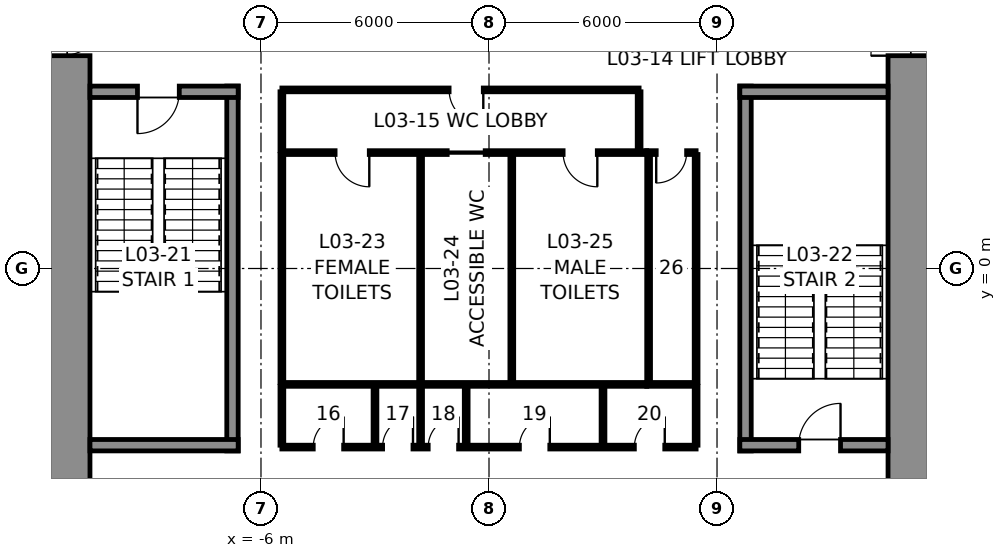
"""IFC4 building model, lengths in metres.
Left out: names, types, materials, properties, quantities, classifications, styles, units other than length and angle.
Written with IfcOpenShell. Run it as: python <this file> out.ifc"""

import sys

from ifc_helpers import new_model, si_unit, direction, frame, frame_2d, origin, place, context, subcontext, project, spatial, rectangle, extrude, element, fill, save


model = new_model("IFC4")
c1 = context("Model", 3, precision=1e-05, world=origin(), true_north=direction((0.0, 1.0)))
c2 = subcontext(c1, "Body", "Model", "MODEL_VIEW")
j1 = project(units=[si_unit("LENGTHUNIT", "METRE"), si_unit("PLANEANGLEUNIT", "RADIAN")], contexts=[c1])
p1 = place(None, origin())
s1 = spatial("IfcSite", under=j1, at=p1, CompositionType="ELEMENT")
p2 = place(p1, origin())
s2 = spatial("IfcBuilding", under=s1, at=p2, CompositionType="ELEMENT")
p3 = place(p2, frame((0.0, 0.0, 16.0)))
s3 = spatial("IfcBuildingStorey", under=s2, at=p3, CompositionType="ELEMENT", Elevation=16.0)
p4 = place(p3, frame((11.25, 10.5, 0.0), z_axis=(0.0, 0.0, 1.0), x_axis=(0.0, -1.0, 0.0)))
e1 = element("IfcWall", 1, at=p4, inside=s3, PredefinedType="SHEAR", context=c2, shape_type="SweptSolid", body=[
    extrude(rectangle(XDim=21.0, YDim=1.5, at=frame_2d((10.5, 0.0))), origin(), (0.0, 0.0, 1.0), 5.0),
])
p5 = place(p4, frame((3.7, 0.0, 0.0)))
e2 = element("IfcOpeningElement", 2, at=p5, cuts=e1, PredefinedType="OPENING", context=c2, shape_type="SweptSolid", body=[
    extrude(rectangle(XDim=1.2, YDim=2.3, at=frame_2d((0.6, 1.15))), frame((0.0, 0.76, 0.0), z_axis=(0.0, -1.0, 0.0), x_axis=(1.0, 0.0, 0.0)), (0.0, 0.0, 1.0), 1.52),
])
p6 = place(p4, frame((16.1, 0.0, 0.0)))
e3 = element("IfcOpeningElement", 3, at=p6, cuts=e1, PredefinedType="OPENING", context=c2, shape_type="SweptSolid", body=[
    extrude(rectangle(XDim=1.2, YDim=2.3, at=frame_2d((0.6, 1.15))), frame((0.0, 0.76, 0.0), z_axis=(0.0, -1.0, 0.0), x_axis=(1.0, 0.0, 0.0)), (0.0, 0.0, 1.0), 1.52),
])
p7 = place(p3, frame((-11.25, -10.5, 0.0), z_axis=(0.0, 0.0, 1.0), x_axis=(0.0, 1.0, 0.0)))
e4 = element("IfcWall", 4, at=p7, inside=s3, PredefinedType="SHEAR", context=c2, shape_type="SweptSolid", body=[
    extrude(rectangle(XDim=21.0, YDim=1.5, at=frame_2d((10.5, 0.0))), origin(), (0.0, 0.0, 1.0), 5.0),
])
p8 = place(p7, frame((16.1, 0.0, 0.0)))
e5 = element("IfcOpeningElement", 5, at=p8, cuts=e4, PredefinedType="OPENING", context=c2, shape_type="SweptSolid", body=[
    extrude(rectangle(XDim=1.2, YDim=2.3, at=frame_2d((0.6, 1.15))), frame((0.0, 0.76, 0.0), z_axis=(0.0, -1.0, 0.0), x_axis=(1.0, 0.0, 0.0)), (0.0, 0.0, 1.0), 1.52),
])
p9 = place(p7, frame((3.7, 0.0, 0.0)))
e6 = element("IfcOpeningElement", 6, at=p9, cuts=e4, PredefinedType="OPENING", context=c2, shape_type="SweptSolid", body=[
    extrude(rectangle(XDim=1.2, YDim=2.3, at=frame_2d((0.6, 1.15))), frame((0.0, 0.76, 0.0), z_axis=(0.0, -1.0, 0.0), x_axis=(1.0, 0.0, 0.0)), (0.0, 0.0, 1.0), 1.52),
])
p10 = place(p3, frame((-6.75, -4.8, 0.0), z_axis=(0.0, 0.0, 1.0), x_axis=(0.0, 1.0, 0.0)))
e7 = element("IfcWall", 7, at=p10, inside=s3, PredefinedType="SOLIDWALL", context=c2, shape_type="SweptSolid", body=[
    extrude(rectangle(XDim=9.6, YDim=0.3, at=frame_2d((4.8, 0.0))), origin(), (0.0, 0.0, 1.0), 4.75),
])
p11 = place(p3, frame((-10.5, 4.65, 0.0), z_axis=(0.0, 0.0, 1.0), x_axis=(1.0, 0.0, 0.0)))
e8 = element("IfcWall", 8, at=p11, inside=s3, PredefinedType="SOLIDWALL", context=c2, shape_type="SweptSolid", body=[
    extrude(rectangle(XDim=3.9, YDim=0.3, at=frame_2d((1.95, 0.0))), origin(), (0.0, 0.0, 1.0), 4.75),
])
p12 = place(p11, frame((1.25, 0.0, 0.0)))
e9 = element("IfcOpeningElement", 9, at=p12, cuts=e8, PredefinedType="OPENING", context=c2, shape_type="SweptSolid", body=[
    extrude(rectangle(XDim=1.1, YDim=2.3, at=frame_2d((0.55, 1.15))), frame((0.0, 0.16, 0.0), z_axis=(0.0, -1.0, 0.0), x_axis=(1.0, 0.0, 0.0)), (0.0, 0.0, 1.0), 0.32),
])
p13 = place(p3, frame((-6.6, -4.65, 0.0), z_axis=(0.0, 0.0, 1.0), x_axis=(-1.0, 0.0, 0.0)))
e10 = element("IfcWall", 10, at=p13, inside=s3, PredefinedType="SOLIDWALL", context=c2, shape_type="SweptSolid", body=[
    extrude(rectangle(XDim=3.9, YDim=0.3, at=frame_2d((1.95, 0.0))), origin(), (0.0, 0.0, 1.0), 4.75),
])
p14 = place(p3, frame((6.75, -4.8, 0.0), z_axis=(0.0, 0.0, 1.0), x_axis=(0.0, 1.0, 0.0)))
e11 = element("IfcWall", 11, at=p14, inside=s3, PredefinedType="SOLIDWALL", context=c2, shape_type="SweptSolid", body=[
    extrude(rectangle(XDim=9.6, YDim=0.3, at=frame_2d((4.8, 0.0))), origin(), (0.0, 0.0, 1.0), 4.75),
])
p15 = place(p3, frame((6.6, 4.65, 0.0), z_axis=(0.0, 0.0, 1.0), x_axis=(1.0, 0.0, 0.0)))
e12 = element("IfcWall", 12, at=p15, inside=s3, PredefinedType="SOLIDWALL", context=c2, shape_type="SweptSolid", body=[
    extrude(rectangle(XDim=3.9, YDim=0.3, at=frame_2d((1.95, 0.0))), origin(), (0.0, 0.0, 1.0), 4.75),
])
p16 = place(p3, frame((10.5, -4.65, 0.0), z_axis=(0.0, 0.0, 1.0), x_axis=(-1.0, 0.0, 0.0)))
e13 = element("IfcWall", 13, at=p16, inside=s3, PredefinedType="SOLIDWALL", context=c2, shape_type="SweptSolid", body=[
    extrude(rectangle(XDim=3.9, YDim=0.3, at=frame_2d((1.95, 0.0))), origin(), (0.0, 0.0, 1.0), 4.75),
])
p17 = place(p16, frame((1.25, 0.0, 0.0)))
e14 = element("IfcOpeningElement", 14, at=p17, cuts=e13, PredefinedType="OPENING", context=c2, shape_type="SweptSolid", body=[
    extrude(rectangle(XDim=1.1, YDim=2.3, at=frame_2d((0.55, 1.15))), frame((0.0, 0.16, 0.0), z_axis=(0.0, -1.0, 0.0), x_axis=(1.0, 0.0, 0.0)), (0.0, 0.0, 1.0), 0.32),
])
p18 = place(p3, frame((-5.45, 3.05, 0.0), z_axis=(0.0, 0.0, 1.0), x_axis=(1.0, 0.0, 0.0)))
e15 = element("IfcWall", 15, at=p18, inside=s3, PredefinedType="PARTITIONING", context=c2, shape_type="SweptSolid", body=[
    extrude(rectangle(XDim=9.6, YDim=0.1, at=frame_2d((4.8, 0.0))), origin(), (0.0, 0.0, 1.0), 4.75),
])
p19 = place(p18, frame((1.4, 0.0, 0.0)))
e16 = element("IfcOpeningElement", 16, at=p19, cuts=e15, PredefinedType="OPENING", context=c2, shape_type="SweptSolid", body=[
    extrude(rectangle(XDim=0.9, YDim=2.3, at=frame_2d((0.45, 1.15))), frame((0.0, 0.06, 0.0), z_axis=(0.0, -1.0, 0.0), x_axis=(1.0, 0.0, 0.0)), (0.0, 0.0, 1.0), 0.12),
])
p20 = place(p18, frame((4.35, 0.0, 0.0)))
e17 = element("IfcOpeningElement", 17, at=p20, cuts=e15, PredefinedType="OPENING", context=c2, shape_type="SweptSolid", body=[
    extrude(rectangle(XDim=1.0, YDim=2.3, at=frame_2d((0.5, 1.15))), frame((0.0, 0.06, 0.0), z_axis=(0.0, -1.0, 0.0), x_axis=(1.0, 0.0, 0.0)), (0.0, 0.0, 1.0), 0.12),
])
p21 = place(p18, frame((7.4, 0.0, 0.0)))
e18 = element("IfcOpeningElement", 18, at=p21, cuts=e15, PredefinedType="OPENING", context=c2, shape_type="SweptSolid", body=[
    extrude(rectangle(XDim=0.9, YDim=2.3, at=frame_2d((0.45, 1.15))), frame((0.0, 0.06, 0.0), z_axis=(0.0, -1.0, 0.0), x_axis=(1.0, 0.0, 0.0)), (0.0, 0.0, 1.0), 0.12),
])
p22 = place(p3, frame((4.15, 3.05, 0.0), z_axis=(0.0, 0.0, 1.0), x_axis=(1.0, 0.0, 0.0)))
e19 = element("IfcWall", 19, at=p22, inside=s3, PredefinedType="PARTITIONING", context=c2, shape_type="SweptSolid", body=[
    extrude(rectangle(XDim=1.3, YDim=0.1, at=frame_2d((0.65, 0.0))), origin(), (0.0, 0.0, 1.0), 4.75),
])
p23 = place(p22, frame((0.25, 0.0, 0.0)))
e20 = element("IfcOpeningElement", 20, at=p23, cuts=e19, PredefinedType="OPENING", context=c2, shape_type="SweptSolid", body=[
    extrude(rectangle(XDim=0.8, YDim=2.3, at=frame_2d((0.4, 1.15))), frame((0.0, 0.06, 0.0), z_axis=(0.0, -1.0, 0.0), x_axis=(1.0, 0.0, 0.0)), (0.0, 0.0, 1.0), 0.12),
])
p24 = place(p3, frame((4.15, -3.05, 0.0), z_axis=(0.0, 0.0, 1.0), x_axis=(-1.0, 0.0, 0.0)))
e21 = element("IfcWall", 21, at=p24, inside=s3, PredefinedType="PARTITIONING", context=c2, shape_type="SweptSolid", body=[
    extrude(rectangle(XDim=9.6, YDim=0.1, at=frame_2d((4.8, 0.0))), origin(), (0.0, 0.0, 1.0), 4.75),
])
p25 = place(p3, frame((5.45, -3.05, 0.0), z_axis=(0.0, 0.0, 1.0), x_axis=(-1.0, 0.0, 0.0)))
e22 = element("IfcWall", 22, at=p25, inside=s3, PredefinedType="PARTITIONING", context=c2, shape_type="SweptSolid", body=[
    extrude(rectangle(XDim=1.3, YDim=0.1, at=frame_2d((0.65, 0.0))), origin(), (0.0, 0.0, 1.0), 4.75),
])
for number, where, z_axis, x_axis in (
    (23, (5.45, 3.0, 0.0), (0.0, 0.0, 1.0), (0.0, -1.0, 0.0)),
    (24, (-5.45, -3.0, 0.0), (0.0, 0.0, 1.0), (0.0, 1.0, 0.0)),
    (25, (-1.8, -3.0, 0.0), (0.0, 0.0, 1.0), (0.0, 1.0, 0.0)),
    (26, (0.6, -3.0, 0.0), (0.0, 0.0, 1.0), (0.0, 1.0, 0.0)),
    (27, (4.2, -3.0, 0.0), (0.0, 0.0, 1.0), (0.0, 1.0, 0.0)),
):
    element("IfcWall", number, at=place(p3, frame(where, z_axis=z_axis, x_axis=x_axis)), inside=s3, PredefinedType="PARTITIONING", context=c2, shape_type="SweptSolid", body=[
        extrude(rectangle(XDim=6.0, YDim=0.1, at=frame_2d((3.0, 0.0))), origin(), (0.0, 0.0, 1.0), 4.75),
    ])
p26 = place(p3, frame((-5.45, 4.7, 0.0), z_axis=(0.0, 0.0, 1.0), x_axis=(1.0, 0.0, 0.0)))
e28 = element("IfcWall", 28, at=p26, inside=s3, PredefinedType="PARTITIONING", context=c2, shape_type="SweptSolid", body=[
    extrude(rectangle(XDim=9.4, YDim=0.1, at=frame_2d((4.7, 0.0))), origin(), (0.0, 0.0, 1.0), 4.75),
])
p27 = place(p26, frame((4.4, 0.0, 0.0)))
e29 = element("IfcOpeningElement", 29, at=p27, cuts=e28, PredefinedType="OPENING", context=c2, shape_type="SweptSolid", body=[
    extrude(rectangle(XDim=0.9, YDim=2.3, at=frame_2d((0.45, 1.15))), frame((0.0, 0.06, 0.0), z_axis=(0.0, -1.0, 0.0), x_axis=(1.0, 0.0, 0.0)), (0.0, 0.0, 1.0), 0.12),
])
for number, where, z_axis, x_axis in (
    (30, (-5.45, 3.1, 0.0), (0.0, 0.0, 1.0), (0.0, 1.0, 0.0)),
    (31, (3.95, 3.1, 0.0), (0.0, 0.0, 1.0), (0.0, 1.0, 0.0)),
):
    element("IfcWall", number, at=place(p3, frame(where, z_axis=z_axis, x_axis=x_axis)), inside=s3, PredefinedType="PARTITIONING", context=c2, shape_type="SweptSolid", body=[
        extrude(rectangle(XDim=1.55, YDim=0.1, at=frame_2d((0.775, 0.0))), origin(), (0.0, 0.0, 1.0), 4.75),
    ])
p28 = place(p3, frame((5.45, -4.7, 0.0), z_axis=(0.0, 0.0, 1.0), x_axis=(-1.0, 0.0, 0.0)))
e32 = element("IfcWall", 32, at=p28, inside=s3, PredefinedType="PARTITIONING", context=c2, shape_type="SweptSolid", body=[
    extrude(rectangle(XDim=10.9, YDim=0.1, at=frame_2d((5.45, 0.0))), origin(), (0.0, 0.0, 1.0), 4.75),
])
p29 = place(p28, frame((9.275, 0.0, 0.0)))
e33 = element("IfcOpeningElement", 33, at=p29, cuts=e32, PredefinedType="OPENING", context=c2, shape_type="SweptSolid", body=[
    extrude(rectangle(XDim=0.8, YDim=2.3, at=frame_2d((0.4, 1.15))), frame((0.0, 0.06, 0.0), z_axis=(0.0, -1.0, 0.0), x_axis=(1.0, 0.0, 0.0)), (0.0, 0.0, 1.0), 0.12),
])
p30 = place(p28, frame((7.45, 0.0, 0.0)))
e34 = element("IfcOpeningElement", 34, at=p30, cuts=e32, PredefinedType="OPENING", context=c2, shape_type="SweptSolid", body=[
    extrude(rectangle(XDim=0.8, YDim=2.3, at=frame_2d((0.4, 1.15))), frame((0.0, 0.06, 0.0), z_axis=(0.0, -1.0, 0.0), x_axis=(1.0, 0.0, 0.0)), (0.0, 0.0, 1.0), 0.12),
])
p31 = place(p28, frame((6.25, 0.0, 0.0)))
e35 = element("IfcOpeningElement", 35, at=p31, cuts=e32, PredefinedType="OPENING", context=c2, shape_type="SweptSolid", body=[
    extrude(rectangle(XDim=0.8, YDim=2.3, at=frame_2d((0.4, 1.15))), frame((0.0, 0.06, 0.0), z_axis=(0.0, -1.0, 0.0), x_axis=(1.0, 0.0, 0.0)), (0.0, 0.0, 1.0), 0.12),
])
p32 = place(p28, frame((3.85, 0.0, 0.0)))
e36 = element("IfcOpeningElement", 36, at=p32, cuts=e32, PredefinedType="OPENING", context=c2, shape_type="SweptSolid", body=[
    extrude(rectangle(XDim=0.8, YDim=2.3, at=frame_2d((0.4, 1.15))), frame((0.0, 0.06, 0.0), z_axis=(0.0, -1.0, 0.0), x_axis=(1.0, 0.0, 0.0)), (0.0, 0.0, 1.0), 0.12),
])
p33 = place(p28, frame((0.825, 0.0, 0.0)))
e37 = element("IfcOpeningElement", 37, at=p33, cuts=e32, PredefinedType="OPENING", context=c2, shape_type="SweptSolid", body=[
    extrude(rectangle(XDim=0.8, YDim=2.3, at=frame_2d((0.4, 1.15))), frame((0.0, 0.06, 0.0), z_axis=(0.0, -1.0, 0.0), x_axis=(1.0, 0.0, 0.0)), (0.0, 0.0, 1.0), 0.12),
])
for number, where, z_axis, x_axis in (
    (38, (-5.45, -3.1, 0.0), (0.0, 0.0, 1.0), (0.0, -1.0, 0.0)),
    (39, (5.45, -3.1, 0.0), (0.0, 0.0, 1.0), (0.0, -1.0, 0.0)),
    (40, (-3.0, -3.1, 0.0), (0.0, 0.0, 1.0), (0.0, -1.0, 0.0)),
    (41, (-1.8, -3.1, 0.0), (0.0, 0.0, 1.0), (0.0, -1.0, 0.0)),
    (42, (-0.6, -3.1, 0.0), (0.0, 0.0, 1.0), (0.0, -1.0, 0.0)),
    (43, (3.0, -3.1, 0.0), (0.0, 0.0, 1.0), (0.0, -1.0, 0.0)),
):
    element("IfcWall", number, at=place(p3, frame(where, z_axis=z_axis, x_axis=x_axis)), inside=s3, PredefinedType="PARTITIONING", context=c2, shape_type="SweptSolid", body=[
        extrude(rectangle(XDim=1.55, YDim=0.1, at=frame_2d((0.775, 0.0))), origin(), (0.0, 0.0, 1.0), 4.75),
    ])
p34 = place(p12, frame((1.1, 0.0, 0.0), z_axis=(0.0, 0.0, 1.0), x_axis=(-1.0, 0.0, 0.0)))
e44 = element("IfcDoor", 44, at=p34, inside=s3, OperationType="SINGLE_SWING_RIGHT", PredefinedType="DOOR", context=c2, shape_type="SweptSolid", body=[
    extrude(rectangle(XDim=1.1, YDim=2.3, at=frame_2d((0.55, 1.15))), frame((0.0, 0.025, 0.0), z_axis=(0.0, -1.0, 0.0), x_axis=(1.0, 0.0, 0.0)), (0.0, 0.0, 1.0), 0.05),
])
fill(e9, e44)
p35 = place(p17, frame((1.1, 0.0, 0.0), z_axis=(0.0, 0.0, 1.0), x_axis=(-1.0, 0.0, 0.0)))
e45 = element("IfcDoor", 45, at=p35, inside=s3, OperationType="SINGLE_SWING_RIGHT", PredefinedType="DOOR", context=c2, shape_type="SweptSolid", body=[
    extrude(rectangle(XDim=1.1, YDim=2.3, at=frame_2d((0.55, 1.15))), frame((0.0, 0.025, 0.0), z_axis=(0.0, -1.0, 0.0), x_axis=(1.0, 0.0, 0.0)), (0.0, 0.0, 1.0), 0.05),
])
fill(e14, e45)
p36 = place(p19, frame((0.9, 0.0, 0.0), z_axis=(0.0, 0.0, 1.0), x_axis=(-1.0, 0.0, 0.0)))
e46 = element("IfcDoor", 46, at=p36, inside=s3, OperationType="SINGLE_SWING_LEFT", PredefinedType="DOOR", context=c2, shape_type="SweptSolid", body=[
    extrude(rectangle(XDim=0.9, YDim=2.3, at=frame_2d((0.45, 1.15))), frame((0.0, 0.025, 0.0), z_axis=(0.0, -1.0, 0.0), x_axis=(1.0, 0.0, 0.0)), (0.0, 0.0, 1.0), 0.05),
])
fill(e16, e46)
p37 = place(p20, frame((1.0, 0.0, 0.0), z_axis=(0.0, 0.0, 1.0), x_axis=(-1.0, 0.0, 0.0)))
e47 = element("IfcDoor", 47, at=p37, inside=s3, OperationType="SLIDING_TO_LEFT", PredefinedType="DOOR", context=c2, shape_type="SweptSolid", body=[
    extrude(rectangle(XDim=1.0, YDim=2.3, at=frame_2d((0.5, 1.15))), frame((0.0, 0.025, 0.0), z_axis=(0.0, -1.0, 0.0), x_axis=(1.0, 0.0, 0.0)), (0.0, 0.0, 1.0), 0.05),
])
fill(e17, e47)
p38 = place(p21, frame((0.9, 0.0, 0.0), z_axis=(0.0, 0.0, 1.0), x_axis=(-1.0, 0.0, 0.0)))
e48 = element("IfcDoor", 48, at=p38, inside=s3, OperationType="SINGLE_SWING_LEFT", PredefinedType="DOOR", context=c2, shape_type="SweptSolid", body=[
    extrude(rectangle(XDim=0.9, YDim=2.3, at=frame_2d((0.45, 1.15))), frame((0.0, 0.025, 0.0), z_axis=(0.0, -1.0, 0.0), x_axis=(1.0, 0.0, 0.0)), (0.0, 0.0, 1.0), 0.05),
])
fill(e18, e48)
p39 = place(p23, frame((0.8, 0.0, 0.0), z_axis=(0.0, 0.0, 1.0), x_axis=(-1.0, 0.0, 0.0)))
e49 = element("IfcDoor", 49, at=p39, inside=s3, OperationType="SINGLE_SWING_RIGHT", PredefinedType="DOOR", context=c2, shape_type="SweptSolid", body=[
    extrude(rectangle(XDim=0.8, YDim=2.3, at=frame_2d((0.4, 1.15))), frame((0.0, 0.025, 0.0), z_axis=(0.0, -1.0, 0.0), x_axis=(1.0, 0.0, 0.0)), (0.0, 0.0, 1.0), 0.05),
])
fill(e20, e49)
p40 = place(p27, frame((0.9, 0.0, 0.0), z_axis=(0.0, 0.0, 1.0), x_axis=(-1.0, 0.0, 0.0)))
e50 = element("IfcDoor", 50, at=p40, inside=s3, OperationType="SINGLE_SWING_LEFT", PredefinedType="DOOR", context=c2, shape_type="SweptSolid", body=[
    extrude(rectangle(XDim=0.9, YDim=2.3, at=frame_2d((0.45, 1.15))), frame((0.0, 0.025, 0.0), z_axis=(0.0, -1.0, 0.0), x_axis=(1.0, 0.0, 0.0)), (0.0, 0.0, 1.0), 0.05),
])
fill(e29, e50)
p41 = place(p29, frame((0.8, 0.0, 0.0), z_axis=(0.0, 0.0, 1.0), x_axis=(-1.0, 0.0, 0.0)))
e51 = element("IfcDoor", 51, at=p41, inside=s3, OperationType="SINGLE_SWING_RIGHT", PredefinedType="DOOR", context=c2, shape_type="SweptSolid", body=[
    extrude(rectangle(XDim=0.8, YDim=2.3, at=frame_2d((0.4, 1.15))), frame((0.0, 0.025, 0.0), z_axis=(0.0, -1.0, 0.0), x_axis=(1.0, 0.0, 0.0)), (0.0, 0.0, 1.0), 0.05),
])
fill(e33, e51)
p42 = place(p30, frame((0.8, 0.0, 0.0), z_axis=(0.0, 0.0, 1.0), x_axis=(-1.0, 0.0, 0.0)))
e52 = element("IfcDoor", 52, at=p42, inside=s3, OperationType="SINGLE_SWING_RIGHT", PredefinedType="DOOR", context=c2, shape_type="SweptSolid", body=[
    extrude(rectangle(XDim=0.8, YDim=2.3, at=frame_2d((0.4, 1.15))), frame((0.0, 0.025, 0.0), z_axis=(0.0, -1.0, 0.0), x_axis=(1.0, 0.0, 0.0)), (0.0, 0.0, 1.0), 0.05),
])
fill(e34, e52)
p43 = place(p31, frame((0.8, 0.0, 0.0), z_axis=(0.0, 0.0, 1.0), x_axis=(-1.0, 0.0, 0.0)))
e53 = element("IfcDoor", 53, at=p43, inside=s3, OperationType="SINGLE_SWING_RIGHT", PredefinedType="DOOR", context=c2, shape_type="SweptSolid", body=[
    extrude(rectangle(XDim=0.8, YDim=2.3, at=frame_2d((0.4, 1.15))), frame((0.0, 0.025, 0.0), z_axis=(0.0, -1.0, 0.0), x_axis=(1.0, 0.0, 0.0)), (0.0, 0.0, 1.0), 0.05),
])
fill(e35, e53)
p44 = place(p32, frame((0.8, 0.0, 0.0), z_axis=(0.0, 0.0, 1.0), x_axis=(-1.0, 0.0, 0.0)))
e54 = element("IfcDoor", 54, at=p44, inside=s3, OperationType="SINGLE_SWING_RIGHT", PredefinedType="DOOR", context=c2, shape_type="SweptSolid", body=[
    extrude(rectangle(XDim=0.8, YDim=2.3, at=frame_2d((0.4, 1.15))), frame((0.0, 0.025, 0.0), z_axis=(0.0, -1.0, 0.0), x_axis=(1.0, 0.0, 0.0)), (0.0, 0.0, 1.0), 0.05),
])
fill(e36, e54)
p45 = place(p33, frame((0.8, 0.0, 0.0), z_axis=(0.0, 0.0, 1.0), x_axis=(-1.0, 0.0, 0.0)))
e55 = element("IfcDoor", 55, at=p45, inside=s3, OperationType="SINGLE_SWING_RIGHT", PredefinedType="DOOR", context=c2, shape_type="SweptSolid", body=[
    extrude(rectangle(XDim=0.8, YDim=2.3, at=frame_2d((0.4, 1.15))), frame((0.0, 0.025, 0.0), z_axis=(0.0, -1.0, 0.0), x_axis=(1.0, 0.0, 0.0)), (0.0, 0.0, 1.0), 0.05),
])
fill(e37, e55)
p46 = place(p8, frame((1.2, 0.0, 0.0), z_axis=(0.0, 0.0, 1.0), x_axis=(-1.0, 0.0, 0.0)))
e56 = element("IfcDoor", 56, at=p46, inside=s3, OperationType="SINGLE_SWING_LEFT", PredefinedType="DOOR", context=c2, shape_type="SweptSolid", body=[
    extrude(rectangle(XDim=1.2, YDim=2.3, at=frame_2d((0.6, 1.15))), frame((0.0, 0.025, 0.0), z_axis=(0.0, -1.0, 0.0), x_axis=(1.0, 0.0, 0.0)), (0.0, 0.0, 1.0), 0.05),
])
fill(e5, e56)
p47 = place(p5, frame((1.2, 0.0, 0.0), z_axis=(0.0, 0.0, 1.0), x_axis=(-1.0, 0.0, 0.0)))
e57 = element("IfcDoor", 57, at=p47, inside=s3, OperationType="SINGLE_SWING_LEFT", PredefinedType="DOOR", context=c2, shape_type="SweptSolid", body=[
    extrude(rectangle(XDim=1.2, YDim=2.3, at=frame_2d((0.6, 1.15))), frame((0.0, 0.025, 0.0), z_axis=(0.0, -1.0, 0.0), x_axis=(1.0, 0.0, 0.0)), (0.0, 0.0, 1.0), 0.05),
])
fill(e2, e57)
save(model, sys.argv[1])
